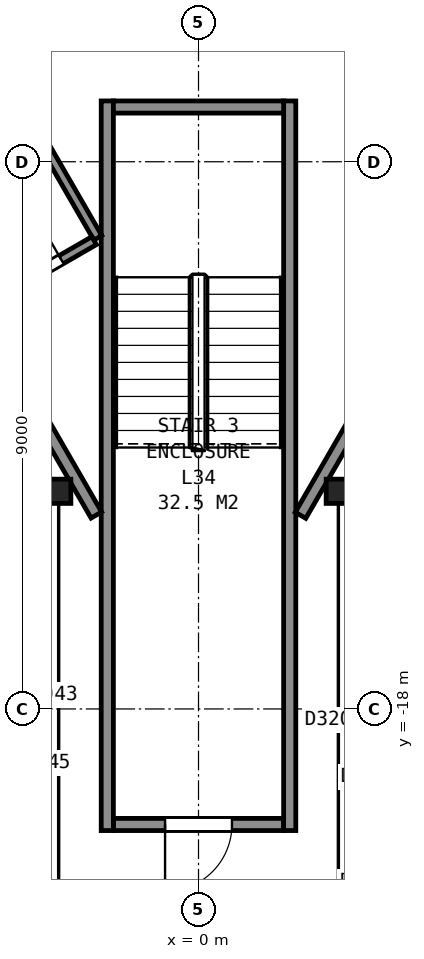
"""IFC4 building model, lengths in metres.
Left out: names, types, materials, properties, quantities, classifications, styles, units other than length and angle.
Written with IfcOpenShell. Run it as: python <this file> out.ifc"""

import sys

from ifc_helpers import new_model, si_unit, direction, frame, frame_2d, origin, origin_2d, place, context, subcontext, project, spatial, rectangle, i_section, extrude, element, fill, save


model = new_model("IFC4")
c1 = context("Model", 3, precision=1e-05, world=origin(), true_north=direction((0.0, 1.0)))
c2 = subcontext(c1, "Body", "Model", "MODEL_VIEW")
j1 = project(units=[si_unit("LENGTHUNIT", "METRE"), si_unit("PLANEANGLEUNIT", "RADIAN")], contexts=[c1])
p1 = place(None, origin())
s1 = spatial("IfcSite", under=j1, at=p1, CompositionType="ELEMENT")
p2 = place(p1, origin())
s2 = spatial("IfcBuilding", under=s1, at=p2, CompositionType="ELEMENT")
p3 = place(p2, frame((0.0, 0.0, 139.6)))
s3 = spatial("IfcBuildingStorey", under=s2, at=p3, CompositionType="ELEMENT", Elevation=139.6)
for number, where, z_axis, x_axis in (
    (1, (-2.3, -14.42, 0.0), (0.0, 0.0, 1.0), (1.0, 0.0, 0.0)),
    (2, (2.3, -14.42, 0.0), (0.0, 0.0, 1.0), (1.0, 0.0, 0.0)),
):
    element("IfcColumn", number, at=place(p3, frame(where, z_axis=z_axis, x_axis=x_axis)), inside=s3, PredefinedType="COLUMN", context=c2, shape_type="SweptSolid", body=[
        extrude(i_section(OverallWidth=0.401, OverallDepth=0.399, WebThickness=0.025, FlangeThickness=0.04, FilletRadius=0.015, at=origin_2d()), origin(), (0.0, 0.0, 1.0), 3.55),
    ])
p4 = place(p3, frame((-1.4, -19.9, 0.0), z_axis=(0.0, 0.0, 1.0), x_axis=(1.0, 0.0, 0.0)))
e3 = element("IfcWall", 3, at=p4, inside=s3, PredefinedType="PARTITIONING", context=c2, shape_type="SweptSolid", body=[
    extrude(rectangle(XDim=2.8, YDim=0.2, at=frame_2d((1.4, 0.0))), origin(), (0.0, 0.0, 1.0), 3.35),
])
p5 = place(p4, frame((0.85, 0.0, 0.0)))
e4 = element("IfcOpeningElement", 4, at=p5, cuts=e3, PredefinedType="OPENING", context=c2, shape_type="SweptSolid", body=[
    extrude(rectangle(XDim=1.1, YDim=2.1, at=frame_2d((0.55, 1.05))), frame((0.0, 0.11, 0.0), z_axis=(0.0, -1.0, 0.0), x_axis=(1.0, 0.0, 0.0)), (0.0, 0.0, 1.0), 0.22),
])
for number, where, z_axis, x_axis in (
    (5, (1.5, -8.0, 0.0), (0.0, 0.0, 1.0), (0.0, -1.0, 0.0)),
    (6, (-1.5, -8.0, 0.0), (0.0, 0.0, 1.0), (0.0, -1.0, 0.0)),
):
    element("IfcWall", number, at=place(p3, frame(where, z_axis=z_axis, x_axis=x_axis)), inside=s3, PredefinedType="PARTITIONING", context=c2, shape_type="SweptSolid", body=[
        extrude(rectangle(XDim=12.0, YDim=0.2, at=frame_2d((6.0, 0.0))), origin(), (0.0, 0.0, 1.0), 3.35),
    ])
p6 = place(p3, frame((-1.4, -8.1, 0.0), z_axis=(0.0, 0.0, 1.0), x_axis=(1.0, 0.0, 0.0)))
e7 = element("IfcWall", 7, at=p6, inside=s3, PredefinedType="PARTITIONING", context=c2, shape_type="SweptSolid", body=[
    extrude(rectangle(XDim=2.8, YDim=0.2, at=frame_2d((1.4, 0.0))), origin(), (0.0, 0.0, 1.0), 3.35),
])
p7 = place(p3, frame((-13.664, 5.946, 0.0), z_axis=(0.0, 0.0, 1.0), x_axis=(0.499994327219, -0.866028678941, 0.0)))
e8 = element("IfcWall", 8, at=p7, inside=s3, PredefinedType="PARTITIONING", context=c2, shape_type="SweptSolid", body=[
    extrude(rectangle(XDim=23.968, YDim=0.2, at=frame_2d((11.984, 0.0))), origin(), (0.0, 0.0, 1.0), 3.35),
])
p8 = place(p3, frame((-1.656, -10.251, 0.0), z_axis=(0.0, 0.0, 1.0), x_axis=(-0.500116590316, 0.865958079869, 0.0)))
e9 = element("IfcWall", 9, at=p8, inside=s3, PredefinedType="PARTITIONING", context=c2, shape_type="SweptSolid", body=[
    extrude(rectangle(XDim=4.093, YDim=0.15, at=frame_2d((2.046, 0.0))), origin(), (0.0, 0.0, 1.0), 3.35),
])
p9 = place(p8, frame((2.693, 0.0, 0.0)))
e10 = element("IfcOpeningElement", 10, at=p9, cuts=e9, PredefinedType="OPENING", context=c2, shape_type="SweptSolid", body=[
    extrude(rectangle(XDim=0.9, YDim=2.1, at=frame_2d((0.45, 1.05))), frame((0.0, 0.085, 0.0), z_axis=(0.0, -1.0, 0.0), x_axis=(1.0, 0.0, 0.0)), (0.0, 0.0, 1.0), 0.17),
])
p10 = place(p3, frame((-3.556, -11.36, 0.0), z_axis=(0.0, 0.0, 1.0), x_axis=(0.866028703517, 0.499994284652, 0.0)))
e11 = element("IfcWall", 11, at=p10, inside=s3, PredefinedType="PARTITIONING", context=c2, shape_type="SweptSolid", body=[
    extrude(rectangle(XDim=2.125, YDim=0.15, at=frame_2d((1.062, 0.0))), origin(), (0.0, 0.0, 1.0), 3.35),
])
p11 = place(p10, frame((0.6, 0.0, 0.0)))
e12 = element("IfcOpeningElement", 12, at=p11, cuts=e11, PredefinedType="OPENING", context=c2, shape_type="SweptSolid", body=[
    extrude(rectangle(XDim=0.9, YDim=2.1, at=frame_2d((0.45, 1.05))), frame((0.0, 0.085, 0.0), z_axis=(0.0, -1.0, 0.0), x_axis=(1.0, 0.0, 0.0)), (0.0, 0.0, 1.0), 0.17),
])
p12 = place(p3, frame((1.677, -14.815, 0.0), z_axis=(0.0, 0.0, 1.0), x_axis=(0.49999445743, 0.866028603765, 0.0)))
e13 = element("IfcWall", 13, at=p12, inside=s3, PredefinedType="PARTITIONING", context=c2, shape_type="SweptSolid", body=[
    extrude(rectangle(XDim=5.905, YDim=0.2, at=frame_2d((2.952, 0.0))), origin(), (0.0, 0.0, 1.0), 3.35),
])
p13 = place(p12, frame((3.855, 0.0, 0.0)))
e14 = element("IfcOpeningElement", 14, at=p13, cuts=e13, PredefinedType="OPENING", context=c2, shape_type="SweptSolid", body=[
    extrude(rectangle(XDim=1.8, YDim=2.1, at=frame_2d((0.9, 1.05))), frame((0.0, 0.11, 0.0), z_axis=(0.0, -1.0, 0.0), x_axis=(1.0, 0.0, 0.0)), (0.0, 0.0, 1.0), 0.22),
])
p14 = place(p5, origin())
e15 = element("IfcDoor", 15, at=p14, inside=s3, OperationType="SINGLE_SWING_LEFT", PredefinedType="DOOR", context=c2, shape_type="SweptSolid", body=[
    extrude(rectangle(XDim=1.1, YDim=2.1, at=frame_2d((0.55, 1.05))), frame((0.0, 0.025, 0.0), z_axis=(0.0, -1.0, 0.0), x_axis=(1.0, 0.0, 0.0)), (0.0, 0.0, 1.0), 0.05),
])
fill(e4, e15)
p15 = place(p11, origin())
e16 = element("IfcDoor", 16, at=p15, inside=s3, OperationType="SINGLE_SWING_RIGHT", PredefinedType="DOOR", context=c2, shape_type="SweptSolid", body=[
    extrude(rectangle(XDim=0.9, YDim=2.1, at=frame_2d((0.45, 1.05))), frame((0.0, 0.025, 0.0), z_axis=(0.0, -1.0, 0.0), x_axis=(1.0, 0.0, 0.0)), (0.0, 0.0, 1.0), 0.05),
])
fill(e12, e16)
save(model, sys.argv[1])
